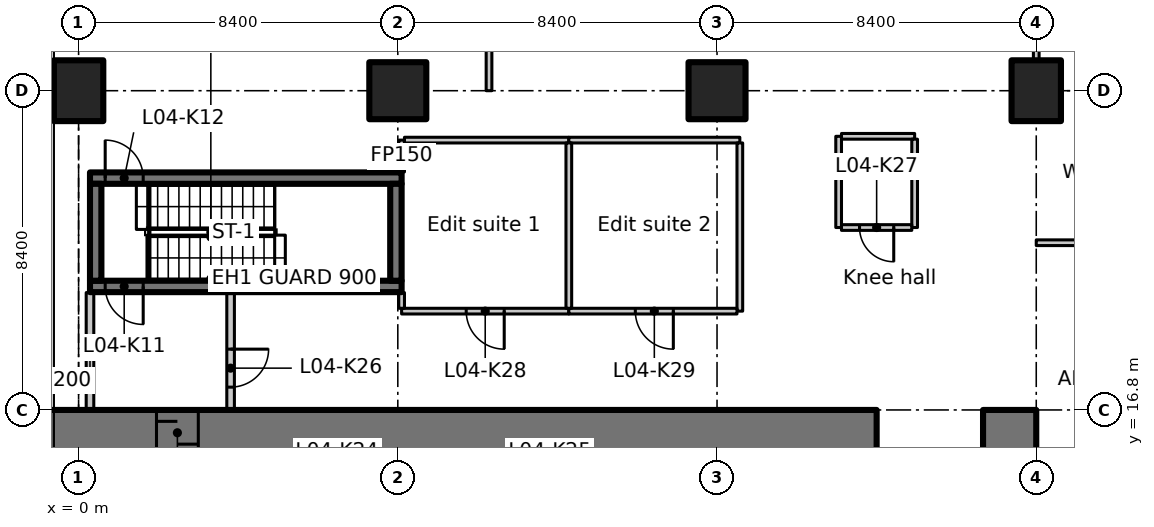
"""IFC4 building model, lengths in metres.
Left out: names, types, materials, properties, quantities, classifications, styles, units other than length and angle.
Written with IfcOpenShell. Run it as: python <this file> out.ifc"""

import sys

from ifc_helpers import new_model, si_unit, direction, frame, frame_2d, origin, origin_2d, place, context, subcontext, project, spatial, rectangle, extrude, element, fill, save


model = new_model("IFC4")
c1 = context("Model", 3, precision=1e-05, world=origin(), true_north=direction((0.0, 1.0)))
c2 = subcontext(c1, "Body", "Model", "MODEL_VIEW")
j1 = project(units=[si_unit("LENGTHUNIT", "METRE"), si_unit("PLANEANGLEUNIT", "RADIAN")], contexts=[c1])
p1 = place(None, origin())
s1 = spatial("IfcSite", under=j1, at=p1, CompositionType="ELEMENT")
p2 = place(p1, origin())
s2 = spatial("IfcBuilding", under=s1, at=p2, CompositionType="ELEMENT")
p3 = place(p2, frame((0.0, 0.0, 27.5)))
s3 = spatial("IfcBuildingStorey", under=s2, at=p3, CompositionType="ELEMENT", Elevation=27.5)
p4 = place(p3, frame((0.0, 25.2, 0.0), z_axis=(0.0, 0.0, 1.0), x_axis=(1.0, 0.0, 0.0)))
e1 = element("IfcColumn", 1, at=p4, inside=s3, PredefinedType="COLUMN", context=c2, shape_type="SweptSolid", body=[
    extrude(rectangle(XDim=1.3, YDim=1.6, at=origin_2d()), origin(), (0.0, 0.0, 1.0), 4.25),
])
for number, where, z_axis, x_axis in (
    (2, (8.4, 25.2, 0.0), (0.0, 0.0, 1.0), (1.0, 0.0, 0.0)),
    (3, (16.8, 25.2, 0.0), (0.0, 0.0, 1.0), (1.0, 0.0, 0.0)),
):
    element("IfcColumn", number, at=place(p3, frame(where, z_axis=z_axis, x_axis=x_axis)), inside=s3, PredefinedType="COLUMN", context=c2, shape_type="SweptSolid", body=[
        extrude(rectangle(XDim=1.5, YDim=1.5, at=origin_2d()), origin(), (0.0, 0.0, 1.0), 4.25),
    ])
p5 = place(p3, frame((25.2, 25.2, 0.0), z_axis=(0.0, 0.0, 1.0), x_axis=(1.0, 0.0, 0.0)))
e4 = element("IfcColumn", 4, at=p5, inside=s3, PredefinedType="COLUMN", context=c2, shape_type="SweptSolid", body=[
    extrude(rectangle(XDim=1.3, YDim=1.6, at=origin_2d()), origin(), (0.0, 0.0, 1.0), 4.25),
])
p6 = place(p3, frame((-1.1, 16.2, 0.0), z_axis=(0.0, 0.0, 1.0), x_axis=(1.0, 0.0, 0.0)))
e5 = element("IfcWall", 5, at=p6, inside=s3, PredefinedType="SHEAR", context=c2, shape_type="SweptSolid", body=[
    extrude(rectangle(XDim=22.1, YDim=1.2, at=frame_2d((11.05, 0.0))), origin(), (0.0, 0.0, 1.0), 4.25),
])
p7 = place(p6, frame((3.15, 0.0, 0.0)))
e6 = element("IfcOpeningElement", 6, at=p7, cuts=e5, PredefinedType="OPENING", context=c2, shape_type="SweptSolid", body=[
    extrude(rectangle(XDim=1.1, YDim=2.3, at=frame_2d((0.55, 1.15))), frame((0.0, 0.61, 0.0), z_axis=(0.0, -1.0, 0.0), x_axis=(1.0, 0.0, 0.0)), (0.0, 0.0, 1.0), 1.22),
])
p8 = place(p3, frame((23.8, 16.2, 0.0), z_axis=(0.0, 0.0, 1.0), x_axis=(1.0, 0.0, 0.0)))
e7 = element("IfcWall", 7, at=p8, inside=s3, PredefinedType="SHEAR", context=c2, shape_type="SweptSolid", body=[
    extrude(rectangle(XDim=1.4, YDim=1.2, at=frame_2d((0.7, 0.0))), origin(), (0.0, 0.0, 1.0), 4.25),
])
p9 = place(p3, frame((8.5, 20.05, 0.0), z_axis=(0.0, 0.0, 1.0), x_axis=(-1.0, 0.0, 0.0)))
e8 = element("IfcWall", 8, at=p9, inside=s3, PredefinedType="SHEAR", context=c2, shape_type="SweptSolid", body=[
    extrude(rectangle(XDim=8.2, YDim=0.3, at=frame_2d((4.1, 0.0))), origin(), (0.0, 0.0, 1.0), 4.25),
])
p10 = place(p9, frame((6.8, 0.0, 0.0)))
e9 = element("IfcOpeningElement", 9, at=p10, cuts=e8, PredefinedType="OPENING", context=c2, shape_type="SweptSolid", body=[
    extrude(rectangle(XDim=1.0, YDim=2.1, at=frame_2d((0.5, 1.05))), frame((0.0, 0.16, 0.0), z_axis=(0.0, -1.0, 0.0), x_axis=(1.0, 0.0, 0.0)), (0.0, 0.0, 1.0), 0.32),
])
p11 = place(p3, frame((0.3, 22.9, 0.0), z_axis=(0.0, 0.0, 1.0), x_axis=(1.0, 0.0, 0.0)))
e10 = element("IfcWall", 10, at=p11, inside=s3, PredefinedType="SHEAR", context=c2, shape_type="SweptSolid", body=[
    extrude(rectangle(XDim=8.2, YDim=0.3, at=frame_2d((4.1, 0.0))), origin(), (0.0, 0.0, 1.0), 4.25),
])
p12 = place(p11, frame((0.4, 0.0, 0.0)))
e11 = element("IfcOpeningElement", 11, at=p12, cuts=e10, PredefinedType="OPENING", context=c2, shape_type="SweptSolid", body=[
    extrude(rectangle(XDim=1.0, YDim=2.1, at=frame_2d((0.5, 1.05))), frame((0.0, 0.16, 0.0), z_axis=(0.0, -1.0, 0.0), x_axis=(1.0, 0.0, 0.0)), (0.0, 0.0, 1.0), 0.32),
])
for number, where, z_axis, x_axis in (
    (12, (0.45, 20.2, 0.0), (0.0, 0.0, 1.0), (0.0, 1.0, 0.0)),
    (13, (8.35, 20.2, 0.0), (0.0, 0.0, 1.0), (0.0, 1.0, 0.0)),
):
    element("IfcWall", number, at=place(p3, frame(where, z_axis=z_axis, x_axis=x_axis)), inside=s3, PredefinedType="SHEAR", context=c2, shape_type="SweptSolid", body=[
        extrude(rectangle(XDim=2.55, YDim=0.3, at=frame_2d((1.275, 0.0))), origin(), (0.0, 0.0, 1.0), 4.25),
    ])
p13 = place(p3, frame((0.3, 16.812, 0.0), z_axis=(0.0, 0.0, 1.0), x_axis=(0.0, 1.0, 0.0)))
e14 = element("IfcWall", 14, at=p13, inside=s3, PredefinedType="PARTITIONING", context=c2, shape_type="SweptSolid", body=[
    extrude(rectangle(XDim=3.076, YDim=0.2, at=frame_2d((1.538, 0.0))), origin(), (0.0, 0.0, 1.0), 3.88),
])
p14 = place(p3, frame((4.0, 19.888, 0.0), z_axis=(0.0, 0.0, 1.0), x_axis=(0.0, -1.0, 0.0)))
e15 = element("IfcWall", 15, at=p14, inside=s3, PredefinedType="PARTITIONING", context=c2, shape_type="SweptSolid", body=[
    extrude(rectangle(XDim=3.076, YDim=0.2, at=frame_2d((1.538, 0.0))), origin(), (0.0, 0.0, 1.0), 4.25),
])
p15 = place(p14, frame((1.488, 0.0, 0.0)))
e16 = element("IfcOpeningElement", 16, at=p15, cuts=e15, PredefinedType="OPENING", context=c2, shape_type="SweptSolid", body=[
    extrude(rectangle(XDim=1.0, YDim=2.1, at=frame_2d((0.5, 1.05))), frame((0.0, 0.11, 0.0), z_axis=(0.0, -1.0, 0.0), x_axis=(1.0, 0.0, 0.0)), (0.0, 0.0, 1.0), 0.22),
])
p16 = place(p3, frame((12.9, 19.4, 0.0), z_axis=(0.0, 0.0, 1.0), x_axis=(-1.0, 0.0, 0.0)))
e17 = element("IfcWall", 17, at=p16, inside=s3, PredefinedType="PARTITIONING", context=c2, shape_type="SweptSolid", body=[
    extrude(rectangle(XDim=4.4, YDim=0.15, at=frame_2d((2.2, 0.0))), origin(), (0.0, 0.0, 1.0), 4.25),
])
p17 = place(p16, frame((1.7, 0.0, 0.0)))
e18 = element("IfcOpeningElement", 18, at=p17, cuts=e17, PredefinedType="OPENING", context=c2, shape_type="SweptSolid", body=[
    extrude(rectangle(XDim=1.0, YDim=2.1, at=frame_2d((0.5, 1.05))), frame((0.0, 0.085, 0.0), z_axis=(0.0, -1.0, 0.0), x_axis=(1.0, 0.0, 0.0)), (0.0, 0.0, 1.0), 0.17),
])
p18 = place(p3, frame((8.5, 19.475, 0.0), z_axis=(0.0, 0.0, 1.0), x_axis=(0.0, 1.0, 0.0)))
e19 = element("IfcWall", 19, at=p18, inside=s3, PredefinedType="PARTITIONING", context=c2, shape_type="SweptSolid", body=[
    extrude(rectangle(XDim=0.413, YDim=0.15, at=frame_2d((0.207, 0.0))), origin(), (0.0, 0.0, 1.0), 4.25),
])
p19 = place(p3, frame((8.5, 23.062, 0.0), z_axis=(0.0, 0.0, 1.0), x_axis=(0.0, 1.0, 0.0)))
e20 = element("IfcWall", 20, at=p19, inside=s3, PredefinedType="PARTITIONING", context=c2, shape_type="SweptSolid", body=[
    extrude(rectangle(XDim=0.838, YDim=0.15, at=frame_2d((0.419, 0.0))), origin(), (0.0, 0.0, 1.0), 4.25),
])
p20 = place(p3, frame((8.575, 23.9, 0.0), z_axis=(0.0, 0.0, 1.0), x_axis=(1.0, 0.0, 0.0)))
e21 = element("IfcWall", 21, at=p20, inside=s3, PredefinedType="PARTITIONING", context=c2, shape_type="SweptSolid", body=[
    extrude(rectangle(XDim=4.325, YDim=0.15, at=frame_2d((2.163, 0.0))), origin(), (0.0, 0.0, 1.0), 4.25),
])
p21 = place(p3, frame((12.9, 23.9, 0.0), z_axis=(0.0, 0.0, 1.0), x_axis=(1.0, 0.0, 0.0)))
e22 = element("IfcWall", 22, at=p21, inside=s3, PredefinedType="PARTITIONING", context=c2, shape_type="SweptSolid", body=[
    extrude(rectangle(XDim=4.5, YDim=0.15, at=frame_2d((2.25, 0.0))), origin(), (0.0, 0.0, 1.0), 4.25),
])
p22 = place(p3, frame((17.4, 23.825, 0.0), z_axis=(0.0, 0.0, 1.0), x_axis=(0.0, -1.0, 0.0)))
e23 = element("IfcWall", 23, at=p22, inside=s3, PredefinedType="PARTITIONING", context=c2, shape_type="SweptSolid", body=[
    extrude(rectangle(XDim=4.425, YDim=0.15, at=frame_2d((2.212, 0.0))), origin(), (0.0, 0.0, 1.0), 4.25),
])
p23 = place(p3, frame((17.325, 19.4, 0.0), z_axis=(0.0, 0.0, 1.0), x_axis=(-1.0, 0.0, 0.0)))
e24 = element("IfcWall", 24, at=p23, inside=s3, PredefinedType="PARTITIONING", context=c2, shape_type="SweptSolid", body=[
    extrude(rectangle(XDim=4.425, YDim=0.15, at=frame_2d((2.212, 0.0))), origin(), (0.0, 0.0, 1.0), 4.25),
])
p24 = place(p23, frame((1.675, 0.0, 0.0)))
e25 = element("IfcOpeningElement", 25, at=p24, cuts=e24, PredefinedType="OPENING", context=c2, shape_type="SweptSolid", body=[
    extrude(rectangle(XDim=1.0, YDim=2.1, at=frame_2d((0.5, 1.05))), frame((0.0, 0.085, 0.0), z_axis=(0.0, -1.0, 0.0), x_axis=(1.0, 0.0, 0.0)), (0.0, 0.0, 1.0), 0.17),
])
p25 = place(p3, frame((12.9, 23.825, 0.0), z_axis=(0.0, 0.0, 1.0), x_axis=(0.0, -1.0, 0.0)))
e26 = element("IfcWall", 26, at=p25, inside=s3, PredefinedType="PARTITIONING", context=c2, shape_type="SweptSolid", body=[
    extrude(rectangle(XDim=4.35, YDim=0.15, at=frame_2d((2.175, 0.0))), origin(), (0.0, 0.0, 1.0), 4.25),
])
p26 = place(p3, frame((20.0, 21.6, 0.0), z_axis=(0.0, 0.0, 1.0), x_axis=(0.0, 1.0, 0.0)))
e27 = element("IfcWall", 27, at=p26, inside=s3, PredefinedType="PARTITIONING", context=c2, shape_type="SweptSolid", body=[
    extrude(rectangle(XDim=2.4, YDim=0.15, at=frame_2d((1.2, 0.0))), origin(), (0.0, 0.0, 1.0), 4.25),
])
p27 = place(p3, frame((20.075, 24.0, 0.0), z_axis=(0.0, 0.0, 1.0), x_axis=(1.0, 0.0, 0.0)))
e28 = element("IfcWall", 28, at=p27, inside=s3, PredefinedType="PARTITIONING", context=c2, shape_type="SweptSolid", body=[
    extrude(rectangle(XDim=1.925, YDim=0.15, at=frame_2d((0.962, 0.0))), origin(), (0.0, 0.0, 1.0), 4.25),
])
p28 = place(p3, frame((22.0, 23.925, 0.0), z_axis=(0.0, 0.0, 1.0), x_axis=(0.0, -1.0, 0.0)))
e29 = element("IfcWall", 29, at=p28, inside=s3, PredefinedType="PARTITIONING", context=c2, shape_type="SweptSolid", body=[
    extrude(rectangle(XDim=2.325, YDim=0.15, at=frame_2d((1.163, 0.0))), origin(), (0.0, 0.0, 1.0), 4.25),
])
p29 = place(p3, frame((21.925, 21.6, 0.0), z_axis=(0.0, 0.0, 1.0), x_axis=(-1.0, 0.0, 0.0)))
e30 = element("IfcWall", 30, at=p29, inside=s3, PredefinedType="PARTITIONING", context=c2, shape_type="SweptSolid", body=[
    extrude(rectangle(XDim=1.85, YDim=0.15, at=frame_2d((0.925, 0.0))), origin(), (0.0, 0.0, 1.0), 4.25),
])
p30 = place(p29, frame((0.475, 0.0, 0.0)))
e31 = element("IfcOpeningElement", 31, at=p30, cuts=e30, PredefinedType="OPENING", context=c2, shape_type="SweptSolid", body=[
    extrude(rectangle(XDim=0.9, YDim=2.1, at=frame_2d((0.45, 1.05))), frame((0.0, 0.085, 0.0), z_axis=(0.0, -1.0, 0.0), x_axis=(1.0, 0.0, 0.0)), (0.0, 0.0, 1.0), 0.17),
])
p31 = place(p3, frame((25.2, 21.2, 0.0), z_axis=(0.0, 0.0, 1.0), x_axis=(1.0, 0.0, 0.0)))
e32 = element("IfcWall", 32, at=p31, inside=s3, PredefinedType="PARTITIONING", context=c2, shape_type="SweptSolid", body=[
    extrude(rectangle(XDim=4.2, YDim=0.15, at=frame_2d((2.1, 0.0))), origin(), (0.0, 0.0, 1.0), 4.23),
])
p32 = place(p3, frame((25.2, 31.0, 0.0), z_axis=(0.0, 0.0, 1.0), x_axis=(0.0, -1.0, 0.0)))
e33 = element("IfcWall", 33, at=p32, inside=s3, PredefinedType="PARTITIONING", context=c2, shape_type="SweptSolid", body=[
    extrude(rectangle(XDim=4.98, YDim=0.15, at=frame_2d((2.49, 0.0))), origin(), (0.0, 0.0, 1.0), 4.23),
])
p33 = place(p32, frame((2.08, 0.0, 0.0)))
e34 = element("IfcOpeningElement", 34, at=p33, cuts=e33, PredefinedType="OPENING", context=c2, shape_type="SweptSolid", body=[
    extrude(rectangle(XDim=1.1, YDim=2.1, at=frame_2d((0.55, 1.05))), frame((0.0, 0.085, 0.0), z_axis=(0.0, -1.0, 0.0), x_axis=(1.0, 0.0, 0.0)), (0.0, 0.0, 1.0), 0.17),
])
p34 = place(p3, frame((10.8, 25.2, 0.0), z_axis=(0.0, 0.0, 1.0), x_axis=(0.0, 1.0, 0.0)))
e35 = element("IfcWall", 35, at=p34, inside=s3, PredefinedType="PARTITIONING", context=c2, shape_type="SweptSolid", body=[
    extrude(rectangle(XDim=6.0, YDim=0.15, at=frame_2d((3.0, 0.0))), origin(), (0.0, 0.0, 1.0), 4.23),
])
p35 = place(p34, frame((2.1, 0.0, 0.0)))
e36 = element("IfcOpeningElement", 36, at=p35, cuts=e35, PredefinedType="OPENING", context=c2, shape_type="SweptSolid", body=[
    extrude(rectangle(XDim=1.6, YDim=2.1, at=frame_2d((0.8, 1.05))), frame((0.0, 0.085, 0.0), z_axis=(0.0, -1.0, 0.0), x_axis=(1.0, 0.0, 0.0)), (0.0, 0.0, 1.0), 0.17),
])
p36 = place(p7, origin())
e37 = element("IfcDoor", 37, at=p36, inside=s3, OperationType="SLIDING_TO_LEFT", PredefinedType="DOOR", context=c2, shape_type="SweptSolid", body=[
    extrude(rectangle(XDim=1.1, YDim=2.3, at=frame_2d((0.55, 1.15))), frame((0.0, 0.025, 0.0), z_axis=(0.0, -1.0, 0.0), x_axis=(1.0, 0.0, 0.0)), (0.0, 0.0, 1.0), 0.05),
])
fill(e6, e37)
p37 = place(p10, origin())
e38 = element("IfcDoor", 38, at=p37, inside=s3, OperationType="SINGLE_SWING_LEFT", PredefinedType="DOOR", context=c2, shape_type="SweptSolid", body=[
    extrude(rectangle(XDim=1.0, YDim=2.1, at=frame_2d((0.5, 1.05))), frame((0.0, 0.025, 0.0), z_axis=(0.0, -1.0, 0.0), x_axis=(1.0, 0.0, 0.0)), (0.0, 0.0, 1.0), 0.05),
])
fill(e9, e38)
p38 = place(p12, origin())
e39 = element("IfcDoor", 39, at=p38, inside=s3, OperationType="SINGLE_SWING_RIGHT", PredefinedType="DOOR", context=c2, shape_type="SweptSolid", body=[
    extrude(rectangle(XDim=1.0, YDim=2.1, at=frame_2d((0.5, 1.05))), frame((0.0, 0.025, 0.0), z_axis=(0.0, -1.0, 0.0), x_axis=(1.0, 0.0, 0.0)), (0.0, 0.0, 1.0), 0.05),
])
fill(e11, e39)
p39 = place(p15, origin())
e40 = element("IfcDoor", 40, at=p39, inside=s3, OperationType="SINGLE_SWING_RIGHT", PredefinedType="DOOR", context=c2, shape_type="SweptSolid", body=[
    extrude(rectangle(XDim=1.0, YDim=2.1, at=frame_2d((0.5, 1.05))), frame((0.0, 0.025, 0.0), z_axis=(0.0, -1.0, 0.0), x_axis=(1.0, 0.0, 0.0)), (0.0, 0.0, 1.0), 0.05),
])
fill(e16, e40)
p40 = place(p30, origin())
e41 = element("IfcDoor", 41, at=p40, inside=s3, OperationType="SINGLE_SWING_LEFT", PredefinedType="DOOR", context=c2, shape_type="SweptSolid", body=[
    extrude(rectangle(XDim=0.9, YDim=2.1, at=frame_2d((0.45, 1.05))), frame((0.0, 0.025, 0.0), z_axis=(0.0, -1.0, 0.0), x_axis=(1.0, 0.0, 0.0)), (0.0, 0.0, 1.0), 0.05),
])
fill(e31, e41)
p41 = place(p17, origin())
e42 = element("IfcDoor", 42, at=p41, inside=s3, OperationType="SINGLE_SWING_RIGHT", PredefinedType="DOOR", context=c2, shape_type="SweptSolid", body=[
    extrude(rectangle(XDim=1.0, YDim=2.1, at=frame_2d((0.5, 1.05))), frame((0.0, 0.025, 0.0), z_axis=(0.0, -1.0, 0.0), x_axis=(1.0, 0.0, 0.0)), (0.0, 0.0, 1.0), 0.05),
])
fill(e18, e42)
p42 = place(p24, origin())
e43 = element("IfcDoor", 43, at=p42, inside=s3, OperationType="SINGLE_SWING_LEFT", PredefinedType="DOOR", context=c2, shape_type="SweptSolid", body=[
    extrude(rectangle(XDim=1.0, YDim=2.1, at=frame_2d((0.5, 1.05))), frame((0.0, 0.025, 0.0), z_axis=(0.0, -1.0, 0.0), x_axis=(1.0, 0.0, 0.0)), (0.0, 0.0, 1.0), 0.05),
])
fill(e25, e43)
save(model, sys.argv[1])
